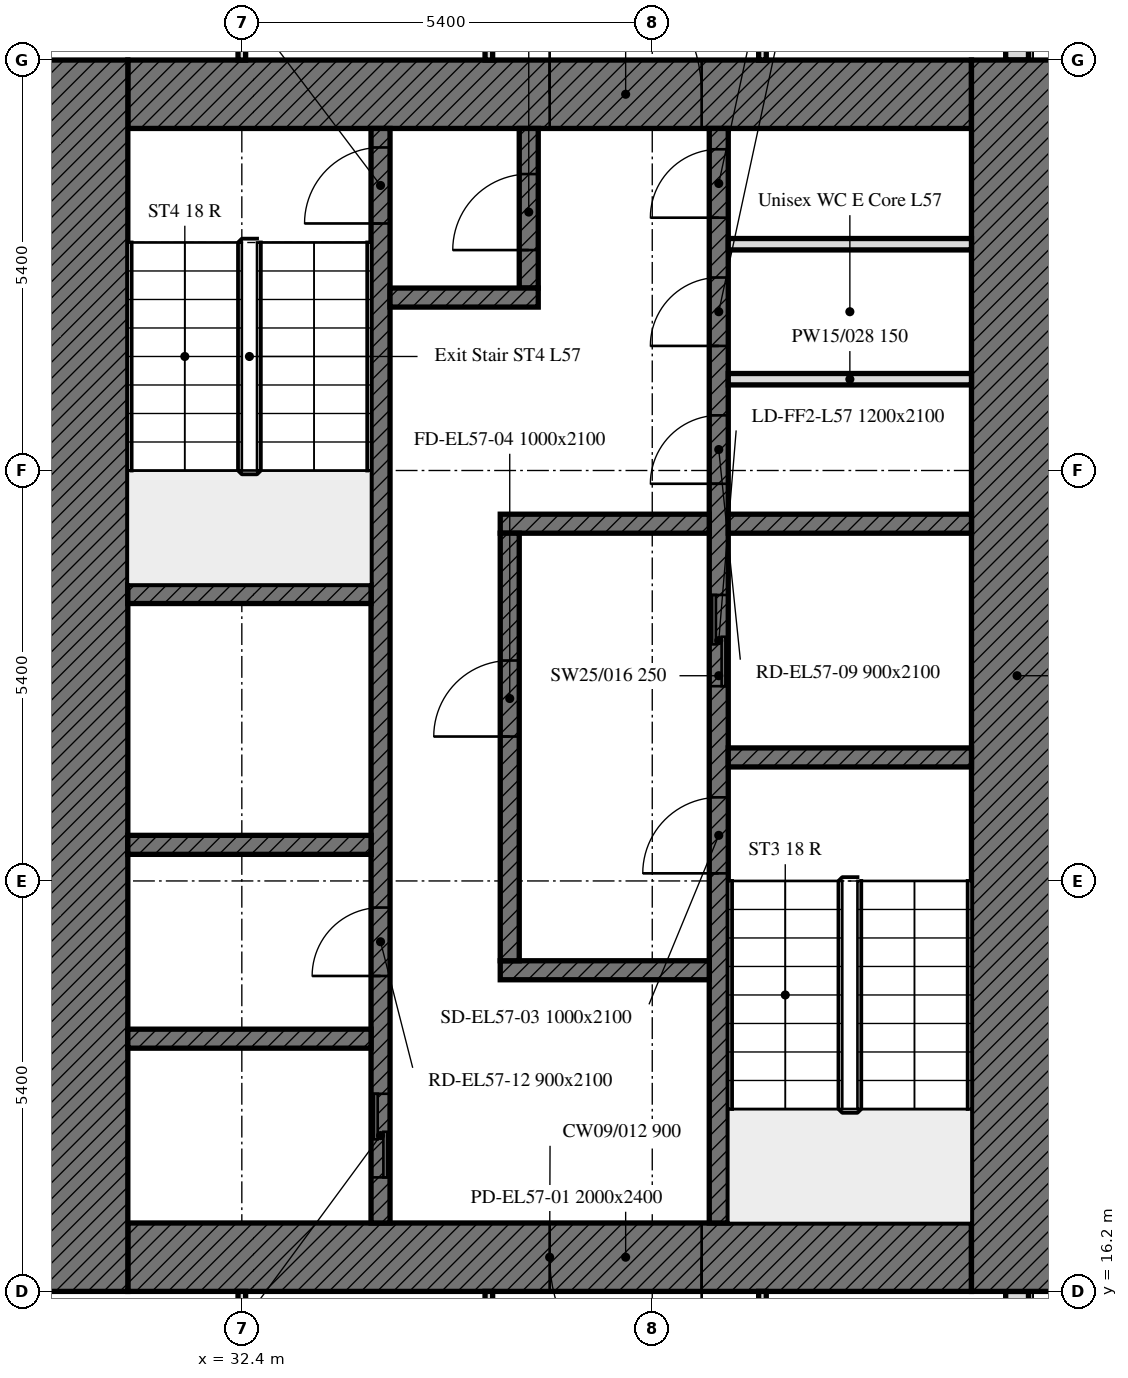
"""IFC4 building model, lengths in metres.
Left out: names, types, materials, properties, quantities, classifications, styles, units other than length and angle.
Written with IfcOpenShell. Run it as: python <this file> out.ifc"""

import sys

from ifc_helpers import new_model, si_unit, direction, frame, frame_2d, origin, place, context, subcontext, project, spatial, rectangle, extrude, element, fill, save


model = new_model("IFC4")
c1 = context("Model", 3, precision=1e-05, world=origin(), true_north=direction((0.0, 1.0)))
c2 = subcontext(c1, "Body", "Model", "MODEL_VIEW")
j1 = project(units=[si_unit("LENGTHUNIT", "METRE"), si_unit("PLANEANGLEUNIT", "RADIAN")], contexts=[c1])
p1 = place(None, origin())
s1 = spatial("IfcSite", under=j1, at=p1, CompositionType="ELEMENT")
p2 = place(p1, origin())
s2 = spatial("IfcBuilding", under=s1, at=p2, CompositionType="ELEMENT")
p3 = place(p2, frame((0.0, 0.0, 226.9)))
s3 = spatial("IfcBuildingStorey", under=s2, at=p3, CompositionType="ELEMENT", Elevation=226.9)
p4 = place(p3, frame((42.6, 10.986, 0.0), z_axis=(0.0, 0.0, 1.0), x_axis=(0.0, 1.0, 0.0)))
e1 = element("IfcWall", 1, at=p4, inside=s3, PredefinedType="SOLIDWALL", context=c2, shape_type="SweptSolid", body=[
    extrude(rectangle(XDim=5.214, YDim=0.3, at=frame_2d((2.607, 0.0))), origin(), (0.0, 0.0, 1.0), 3.0),
])
p5 = place(p4, frame((1.164, 0.0, 0.9)))
e2 = element("IfcOpeningElement", 2, at=p5, cuts=e1, PredefinedType="OPENING", context=c2, shape_type="SweptSolid", body=[
    extrude(rectangle(XDim=1.1, YDim=1.7, at=frame_2d((0.55, 0.85))), frame((0.0, 0.16, 0.0), z_axis=(0.0, -1.0, 0.0), x_axis=(1.0, 0.0, 0.0)), (0.0, 0.0, 1.0), 0.32),
])
p6 = place(p4, frame((2.764, 0.0, 0.9)))
e3 = element("IfcOpeningElement", 3, at=p6, cuts=e1, PredefinedType="OPENING", context=c2, shape_type="SweptSolid", body=[
    extrude(rectangle(XDim=1.1, YDim=1.7, at=frame_2d((0.55, 0.85))), frame((0.0, 0.16, 0.0), z_axis=(0.0, -1.0, 0.0), x_axis=(1.0, 0.0, 0.0)), (0.0, 0.0, 1.0), 0.32),
])
p7 = place(p3, frame((42.6, 32.4, 0.0), z_axis=(0.0, 0.0, 1.0), x_axis=(0.0, 1.0, 0.0)))
e4 = element("IfcWall", 4, at=p7, inside=s3, PredefinedType="SOLIDWALL", context=c2, shape_type="SweptSolid", body=[
    extrude(rectangle(XDim=10.614, YDim=0.3, at=frame_2d((5.307, 0.0))), origin(), (0.0, 0.0, 1.0), 3.0),
])
p8 = place(p7, frame((1.0, 0.0, 0.9)))
e5 = element("IfcOpeningElement", 5, at=p8, cuts=e4, PredefinedType="OPENING", context=c2, shape_type="SweptSolid", body=[
    extrude(rectangle(XDim=3.4, YDim=1.7, at=frame_2d((1.7, 0.85))), frame((0.0, 0.16, 0.0), z_axis=(0.0, -1.0, 0.0), x_axis=(1.0, 0.0, 0.0)), (0.0, 0.0, 1.0), 0.32),
])
p9 = place(p7, frame((6.75, 0.0, 0.9)))
e6 = element("IfcOpeningElement", 6, at=p9, cuts=e4, PredefinedType="OPENING", context=c2, shape_type="SweptSolid", body=[
    extrude(rectangle(XDim=1.1, YDim=1.7, at=frame_2d((0.55, 0.85))), frame((0.0, 0.16, 0.0), z_axis=(0.0, -1.0, 0.0), x_axis=(1.0, 0.0, 0.0)), (0.0, 0.0, 1.0), 0.32),
])
p10 = place(p7, frame((8.35, 0.0, 0.9)))
e7 = element("IfcOpeningElement", 7, at=p10, cuts=e4, PredefinedType="OPENING", context=c2, shape_type="SweptSolid", body=[
    extrude(rectangle(XDim=1.1, YDim=1.7, at=frame_2d((0.55, 0.85))), frame((0.0, 0.16, 0.0), z_axis=(0.0, -1.0, 0.0), x_axis=(1.0, 0.0, 0.0)), (0.0, 0.0, 1.0), 0.32),
])
p11 = place(p3, frame((42.0, 16.65, 0.0), z_axis=(0.0, 0.0, 1.0), x_axis=(-1.0, 0.0, 0.0)))
e8 = element("IfcWall", 8, at=p11, inside=s3, PredefinedType="SOLIDWALL", context=c2, shape_type="SweptSolid", body=[
    extrude(rectangle(XDim=11.1, YDim=0.9, at=frame_2d((5.55, 0.0))), origin(), (0.0, 0.0, 1.0), 3.0),
])
p12 = place(p11, frame((3.55, 0.0, 0.0)))
e9 = element("IfcOpeningElement", 9, at=p12, cuts=e8, PredefinedType="OPENING", context=c2, shape_type="SweptSolid", body=[
    extrude(rectangle(XDim=2.0, YDim=2.4, at=frame_2d((1.0, 1.2))), frame((0.0, 0.45, 0.0), z_axis=(0.0, -1.0, 0.0), x_axis=(1.0, 0.0, 0.0)), (0.0, 0.0, 1.0), 0.9),
])
p13 = place(p3, frame((30.9, 31.95, 0.0), z_axis=(0.0, 0.0, 1.0), x_axis=(1.0, 0.0, 0.0)))
e10 = element("IfcWall", 10, at=p13, inside=s3, PredefinedType="SOLIDWALL", context=c2, shape_type="SweptSolid", body=[
    extrude(rectangle(XDim=11.1, YDim=0.9, at=frame_2d((5.55, 0.0))), origin(), (0.0, 0.0, 1.0), 3.0),
])
p14 = place(p13, frame((5.55, 0.0, 0.0)))
e11 = element("IfcOpeningElement", 11, at=p14, cuts=e10, PredefinedType="OPENING", context=c2, shape_type="SweptSolid", body=[
    extrude(rectangle(XDim=2.0, YDim=2.4, at=frame_2d((1.0, 1.2))), frame((0.0, 0.45, 0.0), z_axis=(0.0, -1.0, 0.0), x_axis=(1.0, 0.0, 0.0)), (0.0, 0.0, 1.0), 0.9),
])
for number, where, z_axis, x_axis in (
    (12, (42.6, 32.4, 0.0), (0.0, 0.0, 1.0), (0.0, -1.0, 0.0)),
    (13, (30.3, 16.2, 0.0), (0.0, 0.0, 1.0), (0.0, 1.0, 0.0)),
):
    element("IfcWall", number, at=place(p3, frame(where, z_axis=z_axis, x_axis=x_axis)), inside=s3, PredefinedType="SOLIDWALL", context=c2, shape_type="SweptSolid", body=[
        extrude(rectangle(XDim=16.2, YDim=1.2, at=frame_2d((8.1, 0.0))), origin(), (0.0, 0.0, 1.0), 3.0),
    ])
p15 = place(p3, frame((38.675, 17.1, 0.0), z_axis=(0.0, 0.0, 1.0), x_axis=(0.0, 1.0, 0.0)))
e14 = element("IfcWall", 14, at=p15, inside=s3, PredefinedType="SOLIDWALL", context=c2, shape_type="SweptSolid", body=[
    extrude(rectangle(XDim=14.4, YDim=0.25, at=frame_2d((7.2, 0.0))), origin(), (0.0, 0.0, 1.0), 3.0),
])
p16 = place(p15, frame((4.6, 0.0, 0.0)))
e15 = element("IfcOpeningElement", 15, at=p16, cuts=e14, PredefinedType="OPENING", context=c2, shape_type="SweptSolid", body=[
    extrude(rectangle(XDim=1.0, YDim=2.1, at=frame_2d((0.5, 1.05))), frame((0.0, 0.125, 0.0), z_axis=(0.0, -1.0, 0.0), x_axis=(1.0, 0.0, 0.0)), (0.0, 0.0, 1.0), 0.25),
])
p17 = place(p15, frame((7.062, 0.0, 0.0)))
e16 = element("IfcOpeningElement", 16, at=p17, cuts=e14, PredefinedType="OPENING", context=c2, shape_type="SweptSolid", body=[
    extrude(rectangle(XDim=1.2, YDim=2.1, at=frame_2d((0.6, 1.05))), frame((0.0, 0.125, 0.0), z_axis=(0.0, -1.0, 0.0), x_axis=(1.0, 0.0, 0.0)), (0.0, 0.0, 1.0), 0.25),
])
p18 = place(p15, frame((9.726, 0.0, 0.0)))
e17 = element("IfcOpeningElement", 17, at=p18, cuts=e14, PredefinedType="OPENING", context=c2, shape_type="SweptSolid", body=[
    extrude(rectangle(XDim=0.9, YDim=2.1, at=frame_2d((0.45, 1.05))), frame((0.0, 0.125, 0.0), z_axis=(0.0, -1.0, 0.0), x_axis=(1.0, 0.0, 0.0)), (0.0, 0.0, 1.0), 0.25),
])
p19 = place(p15, frame((11.539, 0.0, 0.0)))
e18 = element("IfcOpeningElement", 18, at=p19, cuts=e14, PredefinedType="OPENING", context=c2, shape_type="SweptSolid", body=[
    extrude(rectangle(XDim=0.9, YDim=2.1, at=frame_2d((0.45, 1.05))), frame((0.0, 0.125, 0.0), z_axis=(0.0, -1.0, 0.0), x_axis=(1.0, 0.0, 0.0)), (0.0, 0.0, 1.0), 0.25),
])
p20 = place(p15, frame((13.226, 0.0, 0.0)))
e19 = element("IfcOpeningElement", 19, at=p20, cuts=e14, PredefinedType="OPENING", context=c2, shape_type="SweptSolid", body=[
    extrude(rectangle(XDim=0.9, YDim=2.1, at=frame_2d((0.45, 1.05))), frame((0.0, 0.125, 0.0), z_axis=(0.0, -1.0, 0.0), x_axis=(1.0, 0.0, 0.0)), (0.0, 0.0, 1.0), 0.25),
])
p21 = place(p3, frame((34.225, 17.1, 0.0), z_axis=(0.0, 0.0, 1.0), x_axis=(0.0, 1.0, 0.0)))
e20 = element("IfcWall", 20, at=p21, inside=s3, PredefinedType="SOLIDWALL", context=c2, shape_type="SweptSolid", body=[
    extrude(rectangle(XDim=14.4, YDim=0.25, at=frame_2d((7.2, 0.0))), origin(), (0.0, 0.0, 1.0), 3.0),
])
p22 = place(p21, frame((13.15, 0.0, 0.0)))
e21 = element("IfcOpeningElement", 21, at=p22, cuts=e20, PredefinedType="OPENING", context=c2, shape_type="SweptSolid", body=[
    extrude(rectangle(XDim=1.0, YDim=2.1, at=frame_2d((0.5, 1.05))), frame((0.0, 0.125, 0.0), z_axis=(0.0, -1.0, 0.0), x_axis=(1.0, 0.0, 0.0)), (0.0, 0.0, 1.0), 0.25),
])
p23 = place(p21, frame((0.6, 0.0, 0.0)))
e22 = element("IfcOpeningElement", 22, at=p23, cuts=e20, PredefinedType="OPENING", context=c2, shape_type="SweptSolid", body=[
    extrude(rectangle(XDim=1.1, YDim=2.1, at=frame_2d((0.55, 1.05))), frame((0.0, 0.125, 0.0), z_axis=(0.0, -1.0, 0.0), x_axis=(1.0, 0.0, 0.0)), (0.0, 0.0, 1.0), 0.25),
])
p24 = place(p21, frame((3.25, 0.0, 0.0)))
e23 = element("IfcOpeningElement", 23, at=p24, cuts=e20, PredefinedType="OPENING", context=c2, shape_type="SweptSolid", body=[
    extrude(rectangle(XDim=0.9, YDim=2.1, at=frame_2d((0.45, 1.05))), frame((0.0, 0.125, 0.0), z_axis=(0.0, -1.0, 0.0), x_axis=(1.0, 0.0, 0.0)), (0.0, 0.0, 1.0), 0.25),
])
p25 = place(p3, frame((38.8, 23.225, 0.0), z_axis=(0.0, 0.0, 1.0), x_axis=(1.0, 0.0, 0.0)))
e24 = element("IfcWall", 24, at=p25, inside=s3, PredefinedType="SOLIDWALL", context=c2, shape_type="SweptSolid", body=[
    extrude(rectangle(XDim=3.2, YDim=0.25, at=frame_2d((1.6, 0.0))), origin(), (0.0, 0.0, 1.0), 3.0),
])
for number, where, z_axis, x_axis in (
    (25, (30.9, 25.375, 0.0), (0.0, 0.0, 1.0), (1.0, 0.0, 0.0)),
    (26, (30.9, 22.075, 0.0), (0.0, 0.0, 1.0), (1.0, 0.0, 0.0)),
):
    element("IfcWall", number, at=place(p3, frame(where, z_axis=z_axis, x_axis=x_axis)), inside=s3, PredefinedType="SOLIDWALL", context=c2, shape_type="SweptSolid", body=[
        extrude(rectangle(XDim=3.2, YDim=0.25, at=frame_2d((1.6, 0.0))), origin(), (0.0, 0.0, 1.0), 3.0),
    ])
p26 = place(p3, frame((38.8, 26.3, 0.0), z_axis=(0.0, 0.0, 1.0), x_axis=(1.0, 0.0, 0.0)))
e27 = element("IfcWall", 27, at=p26, inside=s3, PredefinedType="SOLIDWALL", context=c2, shape_type="SweptSolid", body=[
    extrude(rectangle(XDim=3.2, YDim=0.25, at=frame_2d((1.6, 0.0))), origin(), (0.0, 0.0, 1.0), 3.0),
])
for number, where, z_axis, x_axis in (
    (28, (35.8, 26.3, 0.0), (0.0, 0.0, 1.0), (1.0, 0.0, 0.0)),
    (29, (35.8, 20.425, 0.0), (0.0, 0.0, 1.0), (1.0, 0.0, 0.0)),
):
    element("IfcWall", number, at=place(p3, frame(where, z_axis=z_axis, x_axis=x_axis)), inside=s3, PredefinedType="SOLIDWALL", context=c2, shape_type="SweptSolid", body=[
        extrude(rectangle(XDim=2.75, YDim=0.25, at=frame_2d((1.375, 0.0))), origin(), (0.0, 0.0, 1.0), 3.0),
    ])
p27 = place(p3, frame((36.175, 29.4, 0.0), z_axis=(0.0, 0.0, 1.0), x_axis=(0.0, 1.0, 0.0)))
e30 = element("IfcWall", 30, at=p27, inside=s3, PredefinedType="SOLIDWALL", context=c2, shape_type="SweptSolid", body=[
    extrude(rectangle(XDim=2.1, YDim=0.25, at=frame_2d((1.05, 0.0))), origin(), (0.0, 0.0, 1.0), 3.0),
])
p28 = place(p27, frame((0.5, 0.0, 0.0)))
e31 = element("IfcOpeningElement", 31, at=p28, cuts=e30, PredefinedType="OPENING", context=c2, shape_type="SweptSolid", body=[
    extrude(rectangle(XDim=1.0, YDim=2.1, at=frame_2d((0.5, 1.05))), frame((0.0, 0.125, 0.0), z_axis=(0.0, -1.0, 0.0), x_axis=(1.0, 0.0, 0.0)), (0.0, 0.0, 1.0), 0.25),
])
p29 = place(p3, frame((34.35, 29.275, 0.0), z_axis=(0.0, 0.0, 1.0), x_axis=(1.0, 0.0, 0.0)))
e32 = element("IfcWall", 32, at=p29, inside=s3, PredefinedType="SOLIDWALL", context=c2, shape_type="SweptSolid", body=[
    extrude(rectangle(XDim=1.95, YDim=0.25, at=frame_2d((0.975, 0.0))), origin(), (0.0, 0.0, 1.0), 3.0),
])
p30 = place(p3, frame((35.925, 20.55, 0.0), z_axis=(0.0, 0.0, 1.0), x_axis=(0.0, 1.0, 0.0)))
e33 = element("IfcWall", 33, at=p30, inside=s3, PredefinedType="SOLIDWALL", context=c2, shape_type="SweptSolid", body=[
    extrude(rectangle(XDim=5.625, YDim=0.25, at=frame_2d((2.812, 0.0))), origin(), (0.0, 0.0, 1.0), 3.0),
])
p31 = place(p30, frame((2.95, 0.0, 0.0)))
e34 = element("IfcOpeningElement", 34, at=p31, cuts=e33, PredefinedType="OPENING", context=c2, shape_type="SweptSolid", body=[
    extrude(rectangle(XDim=1.0, YDim=2.1, at=frame_2d((0.5, 1.05))), frame((0.0, 0.125, 0.0), z_axis=(0.0, -1.0, 0.0), x_axis=(1.0, 0.0, 0.0)), (0.0, 0.0, 1.0), 0.25),
])
p32 = place(p3, frame((30.9, 19.525, 0.0), z_axis=(0.0, 0.0, 1.0), x_axis=(1.0, 0.0, 0.0)))
e35 = element("IfcWall", 35, at=p32, inside=s3, PredefinedType="SOLIDWALL", context=c2, shape_type="SweptSolid", body=[
    extrude(rectangle(XDim=3.2, YDim=0.25, at=frame_2d((1.6, 0.0))), origin(), (0.0, 0.0, 1.0), 3.0),
])
for number, where, z_axis, x_axis in (
    (36, (38.8, 28.201, 0.0), (0.0, 0.0, 1.0), (1.0, 0.0, 0.0)),
    (37, (38.8, 29.977, 0.0), (0.0, 0.0, 1.0), (1.0, 0.0, 0.0)),
):
    element("IfcWall", number, at=place(p3, frame(where, z_axis=z_axis, x_axis=x_axis)), inside=s3, PredefinedType="PARTITIONING", context=c2, shape_type="SweptSolid", body=[
        extrude(rectangle(XDim=3.2, YDim=0.15, at=frame_2d((1.6, 0.0))), origin(), (0.0, 0.0, 1.0), 3.0),
    ])
p33 = place(p3, frame((32.4, 32.4, 0.0), z_axis=(0.0, 0.0, 1.0), x_axis=(0.0, 1.0, 0.0)))
e38 = element("IfcWall", 38, at=p33, inside=s3, PredefinedType="PARTITIONING", context=c2, shape_type="SweptSolid", body=[
    extrude(rectangle(XDim=5.005, YDim=0.1, at=frame_2d((2.502, 0.0))), origin(), (0.0, 0.0, 1.0), 2.4),
])
for number, where, z_axis, x_axis in (
    (39, (39.25, 32.4, 0.0), (0.0, 0.0, 1.0), (0.0, 1.0, 0.0)),
    (40, (35.65, 40.425, 0.0), (0.0, 0.0, 1.0), (0.0, -1.0, 0.0)),
):
    element("IfcWall", number, at=place(p3, frame(where, z_axis=z_axis, x_axis=x_axis)), inside=s3, PredefinedType="PARTITIONING", context=c2, shape_type="SweptSolid", body=[
        extrude(rectangle(XDim=8.025, YDim=0.1, at=frame_2d((4.013, 0.0))), origin(), (0.0, 0.0, 1.0), 3.0),
    ])
for number, where, z_axis, x_axis in (
    (41, (32.4, 13.575, 0.0), (0.0, 0.0, 1.0), (0.0, 1.0, 0.0)),
    (42, (39.25, 13.575, 0.0), (0.0, 0.0, 1.0), (0.0, 1.0, 0.0)),
    (43, (35.65, 16.2, 0.0), (0.0, 0.0, 1.0), (0.0, -1.0, 0.0)),
):
    element("IfcWall", number, at=place(p3, frame(where, z_axis=z_axis, x_axis=x_axis)), inside=s3, PredefinedType="PARTITIONING", context=c2, shape_type="SweptSolid", body=[
        extrude(rectangle(XDim=2.625, YDim=0.1, at=frame_2d((1.312, 0.0))), origin(), (0.0, 0.0, 1.0), 3.0),
    ])
p34 = place(p12, origin())
e44 = element("IfcDoor", 44, at=p34, inside=s3, OperationType="DOUBLE_DOOR_SINGLE_SWING", PredefinedType="DOOR", context=c2, shape_type="SweptSolid", body=[
    extrude(rectangle(XDim=2.0, YDim=2.4, at=frame_2d((1.0, 1.2))), frame((0.0, 0.025, 0.0), z_axis=(0.0, -1.0, 0.0), x_axis=(1.0, 0.0, 0.0)), (0.0, 0.0, 1.0), 0.05),
])
fill(e9, e44)
p35 = place(p14, origin())
e45 = element("IfcDoor", 45, at=p35, inside=s3, OperationType="DOUBLE_DOOR_SINGLE_SWING", PredefinedType="DOOR", context=c2, shape_type="SweptSolid", body=[
    extrude(rectangle(XDim=2.0, YDim=2.4, at=frame_2d((1.0, 1.2))), frame((0.0, 0.025, 0.0), z_axis=(0.0, -1.0, 0.0), x_axis=(1.0, 0.0, 0.0)), (0.0, 0.0, 1.0), 0.05),
])
fill(e11, e45)
p36 = place(p16, origin())
e46 = element("IfcDoor", 46, at=p36, inside=s3, OperationType="SINGLE_SWING_LEFT", PredefinedType="DOOR", context=c2, shape_type="SweptSolid", body=[
    extrude(rectangle(XDim=1.0, YDim=2.1, at=frame_2d((0.5, 1.05))), frame((0.0, 0.025, 0.0), z_axis=(0.0, -1.0, 0.0), x_axis=(1.0, 0.0, 0.0)), (0.0, 0.0, 1.0), 0.05),
])
fill(e15, e46)
p37 = place(p31, origin())
e47 = element("IfcDoor", 47, at=p37, inside=s3, OperationType="SINGLE_SWING_LEFT", PredefinedType="DOOR", context=c2, shape_type="SweptSolid", body=[
    extrude(rectangle(XDim=1.0, YDim=2.1, at=frame_2d((0.5, 1.05))), frame((0.0, 0.025, 0.0), z_axis=(0.0, -1.0, 0.0), x_axis=(1.0, 0.0, 0.0)), (0.0, 0.0, 1.0), 0.05),
])
fill(e34, e47)
p38 = place(p22, origin())
e48 = element("IfcDoor", 48, at=p38, inside=s3, OperationType="SINGLE_SWING_LEFT", PredefinedType="DOOR", context=c2, shape_type="SweptSolid", body=[
    extrude(rectangle(XDim=1.0, YDim=2.1, at=frame_2d((0.5, 1.05))), frame((0.0, 0.025, 0.0), z_axis=(0.0, -1.0, 0.0), x_axis=(1.0, 0.0, 0.0)), (0.0, 0.0, 1.0), 0.05),
])
fill(e21, e48)
p39 = place(p28, origin())
e49 = element("IfcDoor", 49, at=p39, inside=s3, OperationType="SINGLE_SWING_LEFT", PredefinedType="DOOR", context=c2, shape_type="SweptSolid", body=[
    extrude(rectangle(XDim=1.0, YDim=2.1, at=frame_2d((0.5, 1.05))), frame((0.0, 0.025, 0.0), z_axis=(0.0, -1.0, 0.0), x_axis=(1.0, 0.0, 0.0)), (0.0, 0.0, 1.0), 0.05),
])
fill(e31, e49)
p40 = place(p17, origin())
e50 = element("IfcDoor", 50, at=p40, inside=s3, OperationType="DOUBLE_DOOR_SLIDING", PredefinedType="DOOR", context=c2, shape_type="SweptSolid", body=[
    extrude(rectangle(XDim=1.2, YDim=2.1, at=frame_2d((0.6, 1.05))), frame((0.0, 0.025, 0.0), z_axis=(0.0, -1.0, 0.0), x_axis=(1.0, 0.0, 0.0)), (0.0, 0.0, 1.0), 0.05),
])
fill(e16, e50)
p41 = place(p23, origin())
e51 = element("IfcDoor", 51, at=p41, inside=s3, OperationType="DOUBLE_DOOR_SLIDING", PredefinedType="DOOR", context=c2, shape_type="SweptSolid", body=[
    extrude(rectangle(XDim=1.1, YDim=2.1, at=frame_2d((0.55, 1.05))), frame((0.0, 0.025, 0.0), z_axis=(0.0, -1.0, 0.0), x_axis=(1.0, 0.0, 0.0)), (0.0, 0.0, 1.0), 0.05),
])
fill(e22, e51)
p42 = place(p18, origin())
e52 = element("IfcDoor", 52, at=p42, inside=s3, OperationType="SINGLE_SWING_LEFT", PredefinedType="DOOR", context=c2, shape_type="SweptSolid", body=[
    extrude(rectangle(XDim=0.9, YDim=2.1, at=frame_2d((0.45, 1.05))), frame((0.0, 0.025, 0.0), z_axis=(0.0, -1.0, 0.0), x_axis=(1.0, 0.0, 0.0)), (0.0, 0.0, 1.0), 0.05),
])
fill(e17, e52)
p43 = place(p19, origin())
e53 = element("IfcDoor", 53, at=p43, inside=s3, OperationType="SINGLE_SWING_LEFT", PredefinedType="DOOR", context=c2, shape_type="SweptSolid", body=[
    extrude(rectangle(XDim=0.9, YDim=2.1, at=frame_2d((0.45, 1.05))), frame((0.0, 0.025, 0.0), z_axis=(0.0, -1.0, 0.0), x_axis=(1.0, 0.0, 0.0)), (0.0, 0.0, 1.0), 0.05),
])
fill(e18, e53)
p44 = place(p20, origin())
e54 = element("IfcDoor", 54, at=p44, inside=s3, OperationType="SINGLE_SWING_LEFT", PredefinedType="DOOR", context=c2, shape_type="SweptSolid", body=[
    extrude(rectangle(XDim=0.9, YDim=2.1, at=frame_2d((0.45, 1.05))), frame((0.0, 0.025, 0.0), z_axis=(0.0, -1.0, 0.0), x_axis=(1.0, 0.0, 0.0)), (0.0, 0.0, 1.0), 0.05),
])
fill(e19, e54)
p45 = place(p24, origin())
e55 = element("IfcDoor", 55, at=p45, inside=s3, OperationType="SINGLE_SWING_LEFT", PredefinedType="DOOR", context=c2, shape_type="SweptSolid", body=[
    extrude(rectangle(XDim=0.9, YDim=2.1, at=frame_2d((0.45, 1.05))), frame((0.0, 0.025, 0.0), z_axis=(0.0, -1.0, 0.0), x_axis=(1.0, 0.0, 0.0)), (0.0, 0.0, 1.0), 0.05),
])
fill(e23, e55)
save(model, sys.argv[1])
